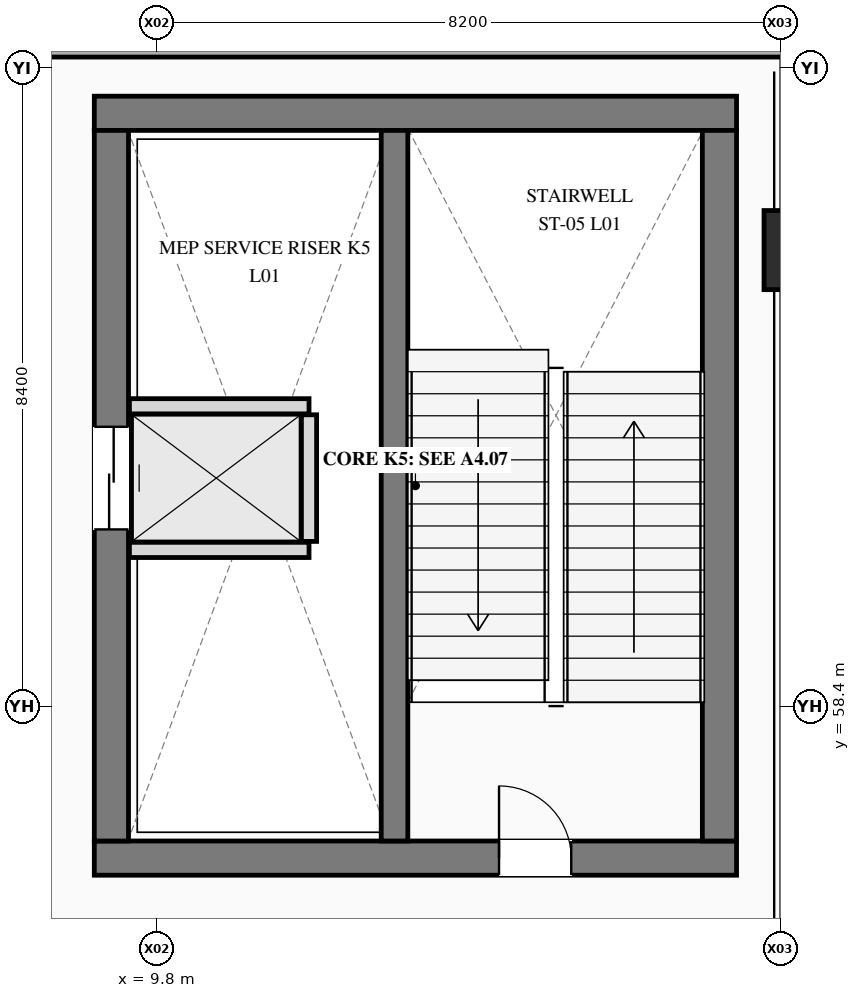
"""IFC4 building model, lengths in metres.
Left out: names, types, materials, properties, quantities, classifications, styles, units other than length and angle.
Written with IfcOpenShell. Run it as: python <this file> out.ifc"""

import sys

from ifc_helpers import new_model, si_unit, direction, frame, frame_2d, origin, origin_2d, place, context, subcontext, project, spatial, rectangle, i_section, extrude, element, fill, save


model = new_model("IFC4")
c1 = context("Model", 3, precision=1e-05, world=origin(), true_north=direction((0.0, 1.0)))
c2 = subcontext(c1, "Body", "Model", "MODEL_VIEW")
j1 = project(units=[si_unit("LENGTHUNIT", "METRE"), si_unit("PLANEANGLEUNIT", "RADIAN")], contexts=[c1])
p1 = place(None, origin())
s1 = spatial("IfcSite", under=j1, at=p1, CompositionType="ELEMENT")
p2 = place(p1, origin())
s2 = spatial("IfcBuilding", under=s1, at=p2, CompositionType="ELEMENT")
p3 = place(p2, frame((0.0, 0.0, 5.4)))
s3 = spatial("IfcBuildingStorey", under=s2, at=p3, CompositionType="ELEMENT", Elevation=5.4)
p4 = place(p3, frame((18.0, 64.4, 0.0), z_axis=(0.0, 0.0, 1.0), x_axis=(1.0, 0.0, 0.0)))
e1 = element("IfcColumn", 1, at=p4, inside=s3, PredefinedType="COLUMN", context=c2, shape_type="SweptSolid", body=[
    extrude(i_section(OverallWidth=0.427, OverallDepth=1.041, WebThickness=0.031, FlangeThickness=0.056, at=origin_2d()), origin(), (0.0, 0.0, 1.0), 5.4),
])
p5 = place(p3, frame((-0.3, 67.11, 0.0), z_axis=(0.0, 0.0, 1.0), x_axis=(1.0, 0.0, 0.0)))
e2 = element("IfcWall", 2, at=p5, inside=s3, PredefinedType="STANDARD", context=c2, shape_type="SweptSolid", body=[
    extrude(rectangle(XDim=23.1, YDim=0.34, at=frame_2d((11.55, 0.0))), origin(), (0.0, 0.0, 1.0), 5.4),
])
p6 = place(p5, frame((2.2, 0.0, 0.9)))
e3 = element("IfcOpeningElement", 3, at=p6, cuts=e2, PredefinedType="OPENING", context=c2, shape_type="SweptSolid", body=[
    extrude(rectangle(XDim=1.8, YDim=1.8, at=frame_2d((0.9, 0.9))), frame((0.0, 0.18, 0.0), z_axis=(0.0, -1.0, 0.0), x_axis=(1.0, 0.0, 0.0)), (0.0, 0.0, 1.0), 0.36),
])
p7 = place(p3, frame((8.975, 56.4, 0.0), z_axis=(0.0, 0.0, 1.0), x_axis=(1.0, 0.0, 0.0)))
e4 = element("IfcWall", 4, at=p7, inside=s3, PredefinedType="SHEAR", context=c2, shape_type="SweptSolid", body=[
    extrude(rectangle(XDim=8.45, YDim=0.45, at=frame_2d((4.225, 0.0))), origin(), (0.0, 0.0, 1.0), 5.4),
])
p8 = place(p7, frame((5.325, 0.0, 0.0)))
e5 = element("IfcOpeningElement", 5, at=p8, cuts=e4, PredefinedType="OPENING", context=c2, shape_type="SweptSolid", body=[
    extrude(rectangle(XDim=0.95, YDim=2.2, at=frame_2d((0.475, 1.1))), frame((0.0, 0.235, 0.0), z_axis=(0.0, -1.0, 0.0), x_axis=(1.0, 0.0, 0.0)), (0.0, 0.0, 1.0), 0.47),
])
p9 = place(p3, frame((17.425, 66.2, 0.0), z_axis=(0.0, 0.0, 1.0), x_axis=(-1.0, 0.0, 0.0)))
e6 = element("IfcWall", 6, at=p9, inside=s3, PredefinedType="SHEAR", context=c2, shape_type="SweptSolid", body=[
    extrude(rectangle(XDim=8.45, YDim=0.45, at=frame_2d((4.225, 0.0))), origin(), (0.0, 0.0, 1.0), 5.4),
])
p10 = place(p3, frame((9.2, 65.975, 0.0), z_axis=(0.0, 0.0, 1.0), x_axis=(0.0, -1.0, 0.0)))
e7 = element("IfcWall", 7, at=p10, inside=s3, PredefinedType="SHEAR", context=c2, shape_type="SweptSolid", body=[
    extrude(rectangle(XDim=9.35, YDim=0.45, at=frame_2d((4.675, 0.0))), origin(), (0.0, 0.0, 1.0), 5.4),
])
p11 = place(p10, frame((3.9, 0.0, 0.0)))
e8 = element("IfcOpeningElement", 8, at=p11, cuts=e7, PredefinedType="OPENING", context=c2, shape_type="SweptSolid", body=[
    extrude(rectangle(XDim=1.35, YDim=2.3, at=frame_2d((0.675, 1.15))), frame((0.0, 0.235, 0.0), z_axis=(0.0, -1.0, 0.0), x_axis=(1.0, 0.0, 0.0)), (0.0, 0.0, 1.0), 0.47),
])
p12 = place(p3, frame((17.2, 56.625, 0.0), z_axis=(0.0, 0.0, 1.0), x_axis=(0.0, 1.0, 0.0)))
e9 = element("IfcWall", 9, at=p12, inside=s3, PredefinedType="SHEAR", context=c2, shape_type="SweptSolid", body=[
    extrude(rectangle(XDim=9.35, YDim=0.45, at=frame_2d((4.675, 0.0))), origin(), (0.0, 0.0, 1.0), 5.4),
])
p13 = place(p3, frame((12.925, 56.625, 0.0), z_axis=(0.0, 0.0, 1.0), x_axis=(0.0, 1.0, 0.0)))
e10 = element("IfcWall", 10, at=p13, inside=s3, PredefinedType="SHEAR", context=c2, shape_type="SweptSolid", body=[
    extrude(rectangle(XDim=9.35, YDim=0.35, at=frame_2d((4.675, 0.0))), origin(), (0.0, 0.0, 1.0), 5.4),
])
for number, where, z_axis, x_axis in (
    (11, (9.437, 60.455, 0.0), (0.0, 0.0, 1.0), (1.0, 0.0, 0.0)),
    (12, (9.437, 62.345, 0.0), (0.0, 0.0, 1.0), (1.0, 0.0, 0.0)),
):
    element("IfcWall", number, at=place(p3, frame(where, z_axis=z_axis, x_axis=x_axis)), inside=s3, PredefinedType="PLUMBINGWALL", context=c2, shape_type="SweptSolid", body=[
        extrude(rectangle(XDim=2.363, YDim=0.2, at=frame_2d((1.182, 0.0))), origin(), (0.0, 0.0, 1.0), 5.095),
    ])
p14 = place(p3, frame((11.8, 60.567, 0.0), z_axis=(0.0, 0.0, 1.0), x_axis=(0.0, 1.0, 0.0)))
e13 = element("IfcWall", 13, at=p14, inside=s3, PredefinedType="PLUMBINGWALL", context=c2, shape_type="SweptSolid", body=[
    extrude(rectangle(XDim=1.666, YDim=0.2, at=frame_2d((0.833, 0.0))), origin(), (0.0, 0.0, 1.0), 5.095),
])
p15 = place(p8, origin())
e14 = element("IfcDoor", 14, at=p15, inside=s3, OperationType="SINGLE_SWING_LEFT", PredefinedType="DOOR", context=c2, shape_type="SweptSolid", body=[
    extrude(rectangle(XDim=0.95, YDim=2.2, at=frame_2d((0.475, 1.1))), frame((0.0, 0.025, 0.0), z_axis=(0.0, -1.0, 0.0), x_axis=(1.0, 0.0, 0.0)), (0.0, 0.0, 1.0), 0.05),
])
fill(e5, e14)
p16 = place(p11, origin())
e15 = element("IfcDoor", 15, at=p16, inside=s3, OperationType="SLIDING_TO_LEFT", PredefinedType="DOOR", context=c2, shape_type="SweptSolid", body=[
    extrude(rectangle(XDim=1.35, YDim=2.3, at=frame_2d((0.675, 1.15))), frame((0.0, 0.025, 0.0), z_axis=(0.0, -1.0, 0.0), x_axis=(1.0, 0.0, 0.0)), (0.0, 0.0, 1.0), 0.05),
])
fill(e8, e15)
save(model, sys.argv[1])
